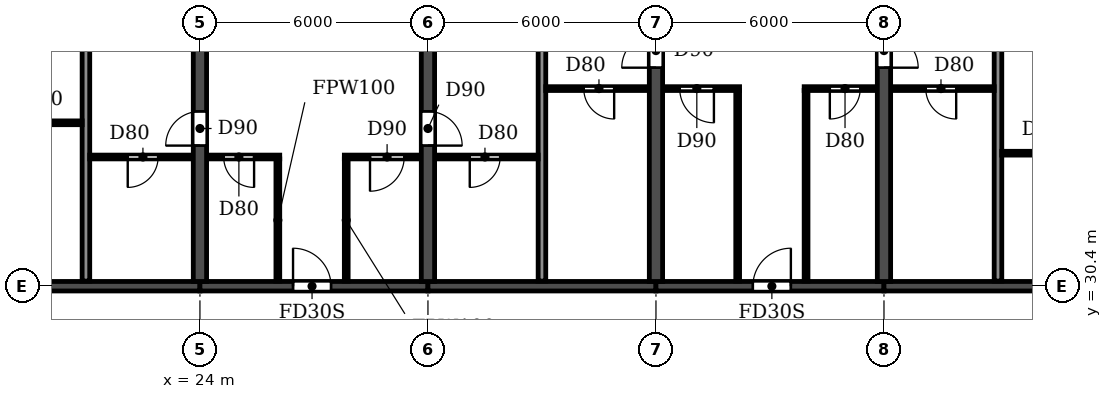
"""IFC4 building model, lengths in metres.
Left out: names, types, materials, properties, quantities, classifications, styles, units other than length and angle.
Written with IfcOpenShell. Run it as: python <this file> out.ifc"""

import sys

from ifc_helpers import new_model, si_unit, direction, frame, frame_2d, origin, place, context, subcontext, project, spatial, rectangle, extrude, element, fill, save


model = new_model("IFC4")
c1 = context("Model", 3, precision=1e-05, world=origin(), true_north=direction((0.0, 1.0)))
c2 = subcontext(c1, "Body", "Model", "MODEL_VIEW")
j1 = project(units=[si_unit("LENGTHUNIT", "METRE"), si_unit("PLANEANGLEUNIT", "RADIAN")], contexts=[c1])
p1 = place(None, origin())
s1 = spatial("IfcSite", under=j1, at=p1, CompositionType="ELEMENT")
p2 = place(p1, origin())
s2 = spatial("IfcBuilding", under=s1, at=p2, CompositionType="ELEMENT")
p3 = place(p2, frame((0.0, 0.0, 92.7)))
s3 = spatial("IfcBuildingStorey", under=s2, at=p3, CompositionType="ELEMENT", Elevation=92.7)
p4 = place(p3, frame((24.0, 30.525, 0.0), z_axis=(0.0, 0.0, 1.0), x_axis=(0.0, 1.0, 0.0)))
e1 = element("IfcWall", 1, at=p4, inside=s3, PredefinedType="SHEAR", context=c2, shape_type="SweptSolid", body=[
    extrude(rectangle(XDim=12.875, YDim=0.35, at=frame_2d((6.438, 0.0))), origin(), (0.0, 0.0, 1.0), 3.06),
])
p5 = place(p4, frame((3.575, 0.0, 0.0)))
e2 = element("IfcOpeningElement", 2, at=p5, cuts=e1, PredefinedType="OPENING", context=c2, shape_type="SweptSolid", body=[
    extrude(rectangle(XDim=0.9, YDim=2.1, at=frame_2d((0.45, 1.05))), frame((0.0, 0.185, 0.0), z_axis=(0.0, -1.0, 0.0), x_axis=(1.0, 0.0, 0.0)), (0.0, 0.0, 1.0), 0.37),
])
p6 = place(p3, frame((30.0, 30.525, 0.0), z_axis=(0.0, 0.0, 1.0), x_axis=(0.0, 1.0, 0.0)))
e3 = element("IfcWall", 3, at=p6, inside=s3, PredefinedType="SHEAR", context=c2, shape_type="SweptSolid", body=[
    extrude(rectangle(XDim=12.875, YDim=0.35, at=frame_2d((6.438, 0.0))), origin(), (0.0, 0.0, 1.0), 3.06),
])
p7 = place(p6, frame((3.575, 0.0, 0.0)))
e4 = element("IfcOpeningElement", 4, at=p7, cuts=e3, PredefinedType="OPENING", context=c2, shape_type="SweptSolid", body=[
    extrude(rectangle(XDim=0.9, YDim=2.1, at=frame_2d((0.45, 1.05))), frame((0.0, 0.185, 0.0), z_axis=(0.0, -1.0, 0.0), x_axis=(1.0, 0.0, 0.0)), (0.0, 0.0, 1.0), 0.37),
])
p8 = place(p3, frame((36.0, 30.525, 0.0), z_axis=(0.0, 0.0, 1.0), x_axis=(0.0, 1.0, 0.0)))
e5 = element("IfcWall", 5, at=p8, inside=s3, PredefinedType="SHEAR", context=c2, shape_type="SweptSolid", body=[
    extrude(rectangle(XDim=12.875, YDim=0.35, at=frame_2d((6.438, 0.0))), origin(), (0.0, 0.0, 1.0), 3.06),
])
p9 = place(p8, frame((5.625, 0.0, 0.0)))
e6 = element("IfcOpeningElement", 6, at=p9, cuts=e5, PredefinedType="OPENING", context=c2, shape_type="SweptSolid", body=[
    extrude(rectangle(XDim=0.9, YDim=2.1, at=frame_2d((0.45, 1.05))), frame((0.0, 0.185, 0.0), z_axis=(0.0, -1.0, 0.0), x_axis=(1.0, 0.0, 0.0)), (0.0, 0.0, 1.0), 0.37),
])
p10 = place(p3, frame((42.0, 30.525, 0.0), z_axis=(0.0, 0.0, 1.0), x_axis=(0.0, 1.0, 0.0)))
e7 = element("IfcWall", 7, at=p10, inside=s3, PredefinedType="SHEAR", context=c2, shape_type="SweptSolid", body=[
    extrude(rectangle(XDim=12.875, YDim=0.35, at=frame_2d((6.438, 0.0))), origin(), (0.0, 0.0, 1.0), 3.06),
])
p11 = place(p10, frame((5.625, 0.0, 0.0)))
e8 = element("IfcOpeningElement", 8, at=p11, cuts=e7, PredefinedType="OPENING", context=c2, shape_type="SweptSolid", body=[
    extrude(rectangle(XDim=0.9, YDim=2.1, at=frame_2d((0.45, 1.05))), frame((0.0, 0.185, 0.0), z_axis=(0.0, -1.0, 0.0), x_axis=(1.0, 0.0, 0.0)), (0.0, 0.0, 1.0), 0.37),
])
p12 = place(p3, frame((18.0, 30.4, 0.0), z_axis=(0.0, 0.0, 1.0), x_axis=(1.0, 0.0, 0.0)))
e9 = element("IfcWall", 9, at=p12, inside=s3, PredefinedType="SHEAR", context=c2, shape_type="SweptSolid", body=[
    extrude(rectangle(XDim=6.0, YDim=0.25, at=frame_2d((3.0, 0.0))), origin(), (0.0, 0.0, 1.0), 2.46),
])
p13 = place(p3, frame((24.0, 30.4, 0.0), z_axis=(0.0, 0.0, 1.0), x_axis=(1.0, 0.0, 0.0)))
e10 = element("IfcWall", 10, at=p13, inside=s3, PredefinedType="SHEAR", context=c2, shape_type="SweptSolid", body=[
    extrude(rectangle(XDim=6.0, YDim=0.25, at=frame_2d((3.0, 0.0))), origin(), (0.0, 0.0, 1.0), 2.46),
])
p14 = place(p13, frame((2.45, 0.0, 0.0)))
e11 = element("IfcOpeningElement", 11, at=p14, cuts=e10, PredefinedType="OPENING", context=c2, shape_type="SweptSolid", body=[
    extrude(rectangle(XDim=1.0, YDim=2.1, at=frame_2d((0.5, 1.05))), frame((0.0, 0.135, 0.0), z_axis=(0.0, -1.0, 0.0), x_axis=(1.0, 0.0, 0.0)), (0.0, 0.0, 1.0), 0.27),
])
p15 = place(p3, frame((30.0, 30.4, 0.0), z_axis=(0.0, 0.0, 1.0), x_axis=(1.0, 0.0, 0.0)))
e12 = element("IfcWall", 12, at=p15, inside=s3, PredefinedType="SHEAR", context=c2, shape_type="SweptSolid", body=[
    extrude(rectangle(XDim=6.0, YDim=0.25, at=frame_2d((3.0, 0.0))), origin(), (0.0, 0.0, 1.0), 2.46),
])
p16 = place(p3, frame((36.0, 30.4, 0.0), z_axis=(0.0, 0.0, 1.0), x_axis=(1.0, 0.0, 0.0)))
e13 = element("IfcWall", 13, at=p16, inside=s3, PredefinedType="SHEAR", context=c2, shape_type="SweptSolid", body=[
    extrude(rectangle(XDim=6.0, YDim=0.25, at=frame_2d((3.0, 0.0))), origin(), (0.0, 0.0, 1.0), 2.46),
])
p17 = place(p16, frame((2.55, 0.0, 0.0)))
e14 = element("IfcOpeningElement", 14, at=p17, cuts=e13, PredefinedType="OPENING", context=c2, shape_type="SweptSolid", body=[
    extrude(rectangle(XDim=1.0, YDim=2.1, at=frame_2d((0.5, 1.05))), frame((0.0, 0.135, 0.0), z_axis=(0.0, -1.0, 0.0), x_axis=(1.0, 0.0, 0.0)), (0.0, 0.0, 1.0), 0.27),
])
p18 = place(p3, frame((42.0, 30.4, 0.0), z_axis=(0.0, 0.0, 1.0), x_axis=(1.0, 0.0, 0.0)))
e15 = element("IfcWall", 15, at=p18, inside=s3, PredefinedType="SHEAR", context=c2, shape_type="SweptSolid", body=[
    extrude(rectangle(XDim=6.0, YDim=0.25, at=frame_2d((3.0, 0.0))), origin(), (0.0, 0.0, 1.0), 2.46),
])
for number, where, z_axis, x_axis in (
    (16, (21.0, 30.535, 0.0), (0.0, 0.0, 1.0), (0.0, 1.0, 0.0)),
    (17, (33.0, 30.535, 0.0), (0.0, 0.0, 1.0), (0.0, 1.0, 0.0)),
    (18, (45.0, 30.535, 0.0), (0.0, 0.0, 1.0), (0.0, 1.0, 0.0)),
):
    element("IfcWall", number, at=place(p3, frame(where, z_axis=z_axis, x_axis=x_axis)), inside=s3, PredefinedType="PARTITIONING", context=c2, shape_type="SweptSolid", body=[
        extrude(rectangle(XDim=13.005, YDim=0.2, at=frame_2d((6.502, 0.0))), origin(), (0.0, 0.0, 1.0), 3.06),
    ])
p19 = place(p3, frame((21.1, 33.8, 0.0), z_axis=(0.0, 0.0, 1.0), x_axis=(1.0, 0.0, 0.0)))
e19 = element("IfcWall", 19, at=p19, inside=s3, PredefinedType="PARTITIONING", context=c2, shape_type="SweptSolid", body=[
    extrude(rectangle(XDim=2.715, YDim=0.1, at=frame_2d((1.357, 0.0))), origin(), (0.0, 0.0, 1.0), 3.06),
])
p20 = place(p19, frame((1.0, 0.0, 0.0)))
e20 = element("IfcOpeningElement", 20, at=p20, cuts=e19, PredefinedType="OPENING", context=c2, shape_type="SweptSolid", body=[
    extrude(rectangle(XDim=0.8, YDim=2.1, at=frame_2d((0.4, 1.05))), frame((0.0, 0.06, 0.0), z_axis=(0.0, -1.0, 0.0), x_axis=(1.0, 0.0, 0.0)), (0.0, 0.0, 1.0), 0.12),
])
p21 = place(p3, frame((24.185, 33.8, 0.0), z_axis=(0.0, 0.0, 1.0), x_axis=(1.0, 0.0, 0.0)))
e21 = element("IfcWall", 21, at=p21, inside=s3, PredefinedType="PARTITIONING", context=c2, shape_type="SweptSolid", body=[
    extrude(rectangle(XDim=1.915, YDim=0.1, at=frame_2d((0.958, 0.0))), origin(), (0.0, 0.0, 1.0), 3.06),
])
p22 = place(p21, frame((0.44, 0.0, 0.0)))
e22 = element("IfcOpeningElement", 22, at=p22, cuts=e21, PredefinedType="OPENING", context=c2, shape_type="SweptSolid", body=[
    extrude(rectangle(XDim=0.8, YDim=2.1, at=frame_2d((0.4, 1.05))), frame((0.0, 0.06, 0.0), z_axis=(0.0, -1.0, 0.0), x_axis=(1.0, 0.0, 0.0)), (0.0, 0.0, 1.0), 0.12),
])
p23 = place(p3, frame((27.8, 33.8, 0.0), z_axis=(0.0, 0.0, 1.0), x_axis=(1.0, 0.0, 0.0)))
e23 = element("IfcWall", 23, at=p23, inside=s3, PredefinedType="PARTITIONING", context=c2, shape_type="SweptSolid", body=[
    extrude(rectangle(XDim=2.015, YDim=0.1, at=frame_2d((1.007, 0.0))), origin(), (0.0, 0.0, 1.0), 3.06),
])
p24 = place(p23, frame((0.675, 0.0, 0.0)))
e24 = element("IfcOpeningElement", 24, at=p24, cuts=e23, PredefinedType="OPENING", context=c2, shape_type="SweptSolid", body=[
    extrude(rectangle(XDim=0.9, YDim=2.1, at=frame_2d((0.45, 1.05))), frame((0.0, 0.06, 0.0), z_axis=(0.0, -1.0, 0.0), x_axis=(1.0, 0.0, 0.0)), (0.0, 0.0, 1.0), 0.12),
])
p25 = place(p3, frame((30.185, 33.8, 0.0), z_axis=(0.0, 0.0, 1.0), x_axis=(1.0, 0.0, 0.0)))
e25 = element("IfcWall", 25, at=p25, inside=s3, PredefinedType="PARTITIONING", context=c2, shape_type="SweptSolid", body=[
    extrude(rectangle(XDim=2.715, YDim=0.1, at=frame_2d((1.357, 0.0))), origin(), (0.0, 0.0, 1.0), 3.06),
])
p26 = place(p25, frame((0.915, 0.0, 0.0)))
e26 = element("IfcOpeningElement", 26, at=p26, cuts=e25, PredefinedType="OPENING", context=c2, shape_type="SweptSolid", body=[
    extrude(rectangle(XDim=0.8, YDim=2.1, at=frame_2d((0.4, 1.05))), frame((0.0, 0.06, 0.0), z_axis=(0.0, -1.0, 0.0), x_axis=(1.0, 0.0, 0.0)), (0.0, 0.0, 1.0), 0.12),
])
p27 = place(p3, frame((45.1, 33.9, 0.0), z_axis=(0.0, 0.0, 1.0), x_axis=(1.0, 0.0, 0.0)))
e27 = element("IfcWall", 27, at=p27, inside=s3, PredefinedType="PARTITIONING", context=c2, shape_type="SweptSolid", body=[
    extrude(rectangle(XDim=2.715, YDim=0.1, at=frame_2d((1.357, 0.0))), origin(), (0.0, 0.0, 1.0), 3.06),
])
p28 = place(p27, frame((1.0, 0.0, 0.0)))
e28 = element("IfcOpeningElement", 28, at=p28, cuts=e27, PredefinedType="OPENING", context=c2, shape_type="SweptSolid", body=[
    extrude(rectangle(XDim=0.8, YDim=2.1, at=frame_2d((0.4, 1.05))), frame((0.0, 0.06, 0.0), z_axis=(0.0, -1.0, 0.0), x_axis=(1.0, 0.0, 0.0)), (0.0, 0.0, 1.0), 0.12),
])
p29 = place(p3, frame((18.185, 34.7, 0.0), z_axis=(0.0, 0.0, 1.0), x_axis=(1.0, 0.0, 0.0)))
e29 = element("IfcWall", 29, at=p29, inside=s3, PredefinedType="PARTITIONING", context=c2, shape_type="SweptSolid", body=[
    extrude(rectangle(XDim=2.715, YDim=0.1, at=frame_2d((1.357, 0.0))), origin(), (0.0, 0.0, 1.0), 3.06),
])
p30 = place(p29, frame((0.915, 0.0, 0.0)))
e30 = element("IfcOpeningElement", 30, at=p30, cuts=e29, PredefinedType="OPENING", context=c2, shape_type="SweptSolid", body=[
    extrude(rectangle(XDim=0.8, YDim=2.1, at=frame_2d((0.4, 1.05))), frame((0.0, 0.06, 0.0), z_axis=(0.0, -1.0, 0.0), x_axis=(1.0, 0.0, 0.0)), (0.0, 0.0, 1.0), 0.12),
])
p31 = place(p3, frame((33.1, 35.6, 0.0), z_axis=(0.0, 0.0, 1.0), x_axis=(1.0, 0.0, 0.0)))
e31 = element("IfcWall", 31, at=p31, inside=s3, PredefinedType="PARTITIONING", context=c2, shape_type="SweptSolid", body=[
    extrude(rectangle(XDim=2.715, YDim=0.1, at=frame_2d((1.357, 0.0))), origin(), (0.0, 0.0, 1.0), 3.06),
])
p32 = place(p31, frame((1.0, 0.0, 0.0)))
e32 = element("IfcOpeningElement", 32, at=p32, cuts=e31, PredefinedType="OPENING", context=c2, shape_type="SweptSolid", body=[
    extrude(rectangle(XDim=0.8, YDim=2.1, at=frame_2d((0.4, 1.05))), frame((0.0, 0.06, 0.0), z_axis=(0.0, -1.0, 0.0), x_axis=(1.0, 0.0, 0.0)), (0.0, 0.0, 1.0), 0.12),
])
p33 = place(p3, frame((36.185, 35.6, 0.0), z_axis=(0.0, 0.0, 1.0), x_axis=(1.0, 0.0, 0.0)))
e33 = element("IfcWall", 33, at=p33, inside=s3, PredefinedType="PARTITIONING", context=c2, shape_type="SweptSolid", body=[
    extrude(rectangle(XDim=2.015, YDim=0.1, at=frame_2d((1.007, 0.0))), origin(), (0.0, 0.0, 1.0), 3.06),
])
p34 = place(p33, frame((0.44, 0.0, 0.0)))
e34 = element("IfcOpeningElement", 34, at=p34, cuts=e33, PredefinedType="OPENING", context=c2, shape_type="SweptSolid", body=[
    extrude(rectangle(XDim=0.9, YDim=2.1, at=frame_2d((0.45, 1.05))), frame((0.0, 0.06, 0.0), z_axis=(0.0, -1.0, 0.0), x_axis=(1.0, 0.0, 0.0)), (0.0, 0.0, 1.0), 0.12),
])
p35 = place(p3, frame((39.9, 35.6, 0.0), z_axis=(0.0, 0.0, 1.0), x_axis=(1.0, 0.0, 0.0)))
e35 = element("IfcWall", 35, at=p35, inside=s3, PredefinedType="PARTITIONING", context=c2, shape_type="SweptSolid", body=[
    extrude(rectangle(XDim=1.915, YDim=0.1, at=frame_2d((0.958, 0.0))), origin(), (0.0, 0.0, 1.0), 3.06),
])
p36 = place(p35, frame((0.675, 0.0, 0.0)))
e36 = element("IfcOpeningElement", 36, at=p36, cuts=e35, PredefinedType="OPENING", context=c2, shape_type="SweptSolid", body=[
    extrude(rectangle(XDim=0.8, YDim=2.1, at=frame_2d((0.4, 1.05))), frame((0.0, 0.06, 0.0), z_axis=(0.0, -1.0, 0.0), x_axis=(1.0, 0.0, 0.0)), (0.0, 0.0, 1.0), 0.12),
])
p37 = place(p3, frame((42.185, 35.6, 0.0), z_axis=(0.0, 0.0, 1.0), x_axis=(1.0, 0.0, 0.0)))
e37 = element("IfcWall", 37, at=p37, inside=s3, PredefinedType="PARTITIONING", context=c2, shape_type="SweptSolid", body=[
    extrude(rectangle(XDim=2.715, YDim=0.1, at=frame_2d((1.357, 0.0))), origin(), (0.0, 0.0, 1.0), 3.06),
])
p38 = place(p37, frame((0.915, 0.0, 0.0)))
e38 = element("IfcOpeningElement", 38, at=p38, cuts=e37, PredefinedType="OPENING", context=c2, shape_type="SweptSolid", body=[
    extrude(rectangle(XDim=0.8, YDim=2.1, at=frame_2d((0.4, 1.05))), frame((0.0, 0.06, 0.0), z_axis=(0.0, -1.0, 0.0), x_axis=(1.0, 0.0, 0.0)), (0.0, 0.0, 1.0), 0.12),
])
for number, where, z_axis, x_axis in (
    (39, (26.05, 30.535, 0.0), (0.0, 0.0, 1.0), (0.0, 1.0, 0.0)),
    (40, (27.85, 30.535, 0.0), (0.0, 0.0, 1.0), (0.0, 1.0, 0.0)),
):
    element("IfcWall", number, at=place(p3, frame(where, z_axis=z_axis, x_axis=x_axis)), inside=s3, PredefinedType="PARTITIONING", context=c2, shape_type="SweptSolid", body=[
        extrude(rectangle(XDim=3.215, YDim=0.1, at=frame_2d((1.607, 0.0))), origin(), (0.0, 0.0, 1.0), 3.06),
    ])
for number, where, z_axis, x_axis in (
    (41, (38.15, 30.535, 0.0), (0.0, 0.0, 1.0), (0.0, 1.0, 0.0)),
    (42, (39.95, 30.535, 0.0), (0.0, 0.0, 1.0), (0.0, 1.0, 0.0)),
):
    element("IfcWall", number, at=place(p3, frame(where, z_axis=z_axis, x_axis=x_axis)), inside=s3, PredefinedType="PARTITIONING", context=c2, shape_type="SweptSolid", body=[
        extrude(rectangle(XDim=5.015, YDim=0.1, at=frame_2d((2.508, 0.0))), origin(), (0.0, 0.0, 1.0), 3.06),
    ])
p39 = place(p20, frame((0.8, 0.0, 0.0), z_axis=(0.0, 0.0, 1.0), x_axis=(-1.0, 0.0, 0.0)))
e43 = element("IfcDoor", 43, at=p39, inside=s3, OperationType="SINGLE_SWING_RIGHT", PredefinedType="DOOR", context=c2, shape_type="SweptSolid", body=[
    extrude(rectangle(XDim=0.8, YDim=2.1, at=frame_2d((0.4, 1.05))), frame((0.0, 0.025, 0.0), z_axis=(0.0, -1.0, 0.0), x_axis=(1.0, 0.0, 0.0)), (0.0, 0.0, 1.0), 0.05),
])
fill(e20, e43)
p40 = place(p26, frame((0.8, 0.0, 0.0), z_axis=(0.0, 0.0, 1.0), x_axis=(-1.0, 0.0, 0.0)))
e44 = element("IfcDoor", 44, at=p40, inside=s3, OperationType="SINGLE_SWING_RIGHT", PredefinedType="DOOR", context=c2, shape_type="SweptSolid", body=[
    extrude(rectangle(XDim=0.8, YDim=2.1, at=frame_2d((0.4, 1.05))), frame((0.0, 0.025, 0.0), z_axis=(0.0, -1.0, 0.0), x_axis=(1.0, 0.0, 0.0)), (0.0, 0.0, 1.0), 0.05),
])
fill(e26, e44)
p41 = place(p5, origin())
e45 = element("IfcDoor", 45, at=p41, inside=s3, OperationType="SINGLE_SWING_LEFT", PredefinedType="DOOR", context=c2, shape_type="SweptSolid", body=[
    extrude(rectangle(XDim=0.9, YDim=2.1, at=frame_2d((0.45, 1.05))), frame((0.0, 0.025, 0.0), z_axis=(0.0, -1.0, 0.0), x_axis=(1.0, 0.0, 0.0)), (0.0, 0.0, 1.0), 0.05),
])
fill(e2, e45)
p42 = place(p22, frame((0.8, 0.0, 0.0), z_axis=(0.0, 0.0, 1.0), x_axis=(-1.0, 0.0, 0.0)))
e46 = element("IfcDoor", 46, at=p42, inside=s3, OperationType="SINGLE_SWING_LEFT", PredefinedType="DOOR", context=c2, shape_type="SweptSolid", body=[
    extrude(rectangle(XDim=0.8, YDim=2.1, at=frame_2d((0.4, 1.05))), frame((0.0, 0.025, 0.0), z_axis=(0.0, -1.0, 0.0), x_axis=(1.0, 0.0, 0.0)), (0.0, 0.0, 1.0), 0.05),
])
fill(e22, e46)
p43 = place(p14, origin())
e47 = element("IfcDoor", 47, at=p43, inside=s3, OperationType="SINGLE_SWING_LEFT", PredefinedType="DOOR", context=c2, shape_type="SweptSolid", body=[
    extrude(rectangle(XDim=1.0, YDim=2.1, at=frame_2d((0.5, 1.05))), frame((0.0, 0.025, 0.0), z_axis=(0.0, -1.0, 0.0), x_axis=(1.0, 0.0, 0.0)), (0.0, 0.0, 1.0), 0.05),
])
fill(e11, e47)
p44 = place(p24, frame((0.9, 0.0, 0.0), z_axis=(0.0, 0.0, 1.0), x_axis=(-1.0, 0.0, 0.0)))
e48 = element("IfcDoor", 48, at=p44, inside=s3, OperationType="SINGLE_SWING_RIGHT", PredefinedType="DOOR", context=c2, shape_type="SweptSolid", body=[
    extrude(rectangle(XDim=0.9, YDim=2.1, at=frame_2d((0.45, 1.05))), frame((0.0, 0.025, 0.0), z_axis=(0.0, -1.0, 0.0), x_axis=(1.0, 0.0, 0.0)), (0.0, 0.0, 1.0), 0.05),
])
fill(e24, e48)
p45 = place(p7, frame((0.9, 0.0, 0.0), z_axis=(0.0, 0.0, 1.0), x_axis=(-1.0, 0.0, 0.0)))
e49 = element("IfcDoor", 49, at=p45, inside=s3, OperationType="SINGLE_SWING_RIGHT", PredefinedType="DOOR", context=c2, shape_type="SweptSolid", body=[
    extrude(rectangle(XDim=0.9, YDim=2.1, at=frame_2d((0.45, 1.05))), frame((0.0, 0.025, 0.0), z_axis=(0.0, -1.0, 0.0), x_axis=(1.0, 0.0, 0.0)), (0.0, 0.0, 1.0), 0.05),
])
fill(e4, e49)
p46 = place(p32, frame((0.8, 0.0, 0.0), z_axis=(0.0, 0.0, 1.0), x_axis=(-1.0, 0.0, 0.0)))
e50 = element("IfcDoor", 50, at=p46, inside=s3, OperationType="SINGLE_SWING_LEFT", PredefinedType="DOOR", context=c2, shape_type="SweptSolid", body=[
    extrude(rectangle(XDim=0.8, YDim=2.1, at=frame_2d((0.4, 1.05))), frame((0.0, 0.025, 0.0), z_axis=(0.0, -1.0, 0.0), x_axis=(1.0, 0.0, 0.0)), (0.0, 0.0, 1.0), 0.05),
])
fill(e32, e50)
p47 = place(p38, frame((0.8, 0.0, 0.0), z_axis=(0.0, 0.0, 1.0), x_axis=(-1.0, 0.0, 0.0)))
e51 = element("IfcDoor", 51, at=p47, inside=s3, OperationType="SINGLE_SWING_LEFT", PredefinedType="DOOR", context=c2, shape_type="SweptSolid", body=[
    extrude(rectangle(XDim=0.8, YDim=2.1, at=frame_2d((0.4, 1.05))), frame((0.0, 0.025, 0.0), z_axis=(0.0, -1.0, 0.0), x_axis=(1.0, 0.0, 0.0)), (0.0, 0.0, 1.0), 0.05),
])
fill(e38, e51)
p48 = place(p9, origin())
e52 = element("IfcDoor", 52, at=p48, inside=s3, OperationType="SINGLE_SWING_LEFT", PredefinedType="DOOR", context=c2, shape_type="SweptSolid", body=[
    extrude(rectangle(XDim=0.9, YDim=2.1, at=frame_2d((0.45, 1.05))), frame((0.0, 0.025, 0.0), z_axis=(0.0, -1.0, 0.0), x_axis=(1.0, 0.0, 0.0)), (0.0, 0.0, 1.0), 0.05),
])
fill(e6, e52)
p49 = place(p34, frame((0.9, 0.0, 0.0), z_axis=(0.0, 0.0, 1.0), x_axis=(-1.0, 0.0, 0.0)))
e53 = element("IfcDoor", 53, at=p49, inside=s3, OperationType="SINGLE_SWING_LEFT", PredefinedType="DOOR", context=c2, shape_type="SweptSolid", body=[
    extrude(rectangle(XDim=0.9, YDim=2.1, at=frame_2d((0.45, 1.05))), frame((0.0, 0.025, 0.0), z_axis=(0.0, -1.0, 0.0), x_axis=(1.0, 0.0, 0.0)), (0.0, 0.0, 1.0), 0.05),
])
fill(e34, e53)
p50 = place(p17, origin())
e54 = element("IfcDoor", 54, at=p50, inside=s3, OperationType="SINGLE_SWING_RIGHT", PredefinedType="DOOR", context=c2, shape_type="SweptSolid", body=[
    extrude(rectangle(XDim=1.0, YDim=2.1, at=frame_2d((0.5, 1.05))), frame((0.0, 0.025, 0.0), z_axis=(0.0, -1.0, 0.0), x_axis=(1.0, 0.0, 0.0)), (0.0, 0.0, 1.0), 0.05),
])
fill(e14, e54)
p51 = place(p36, frame((0.8, 0.0, 0.0), z_axis=(0.0, 0.0, 1.0), x_axis=(-1.0, 0.0, 0.0)))
e55 = element("IfcDoor", 55, at=p51, inside=s3, OperationType="SINGLE_SWING_RIGHT", PredefinedType="DOOR", context=c2, shape_type="SweptSolid", body=[
    extrude(rectangle(XDim=0.8, YDim=2.1, at=frame_2d((0.4, 1.05))), frame((0.0, 0.025, 0.0), z_axis=(0.0, -1.0, 0.0), x_axis=(1.0, 0.0, 0.0)), (0.0, 0.0, 1.0), 0.05),
])
fill(e36, e55)
p52 = place(p11, frame((0.9, 0.0, 0.0), z_axis=(0.0, 0.0, 1.0), x_axis=(-1.0, 0.0, 0.0)))
e56 = element("IfcDoor", 56, at=p52, inside=s3, OperationType="SINGLE_SWING_RIGHT", PredefinedType="DOOR", context=c2, shape_type="SweptSolid", body=[
    extrude(rectangle(XDim=0.9, YDim=2.1, at=frame_2d((0.45, 1.05))), frame((0.0, 0.025, 0.0), z_axis=(0.0, -1.0, 0.0), x_axis=(1.0, 0.0, 0.0)), (0.0, 0.0, 1.0), 0.05),
])
fill(e8, e56)
save(model, sys.argv[1])
